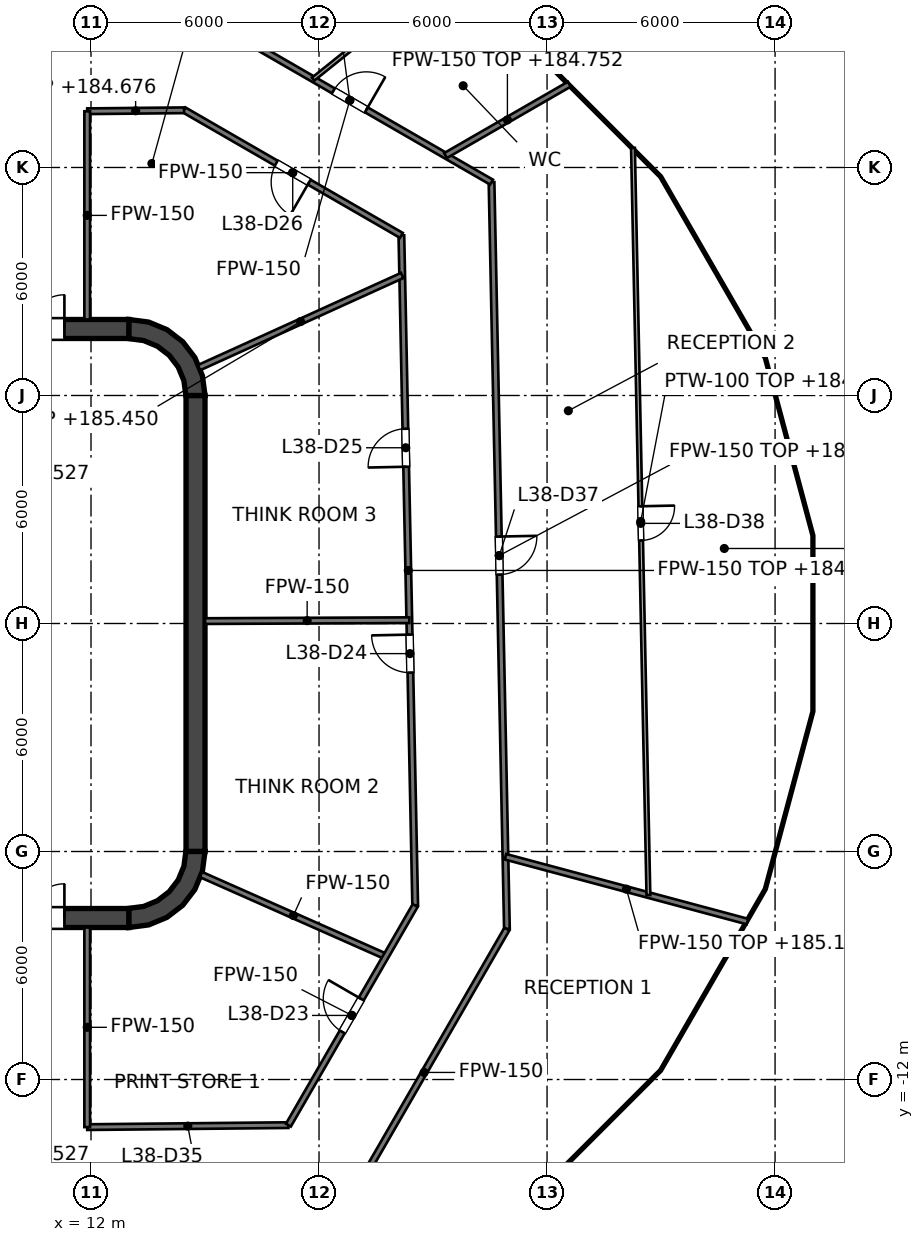
"""IFC4 building model, lengths in metres.
Left out: names, types, materials, properties, quantities, classifications, styles, units other than length and angle.
Written with IfcOpenShell. Run it as: python <this file> out.ifc"""

import sys

from ifc_helpers import new_model, si_unit, direction, frame, frame_2d, origin, place, context, subcontext, project, spatial, polyline, rectangle, outline, extrude, element, fill, save


model = new_model("IFC4")
c1 = context("Model", 3, precision=1e-05, world=origin(), true_north=direction((0.0, 1.0)))
c2 = subcontext(c1, "Body", "Model", "MODEL_VIEW")
j1 = project(units=[si_unit("LENGTHUNIT", "METRE"), si_unit("PLANEANGLEUNIT", "RADIAN")], contexts=[c1])
p1 = place(None, origin())
s1 = spatial("IfcSite", under=j1, at=p1, CompositionType="ELEMENT")
p2 = place(p1, origin())
s2 = spatial("IfcBuilding", under=s1, at=p2, CompositionType="ELEMENT")
p3 = place(p2, frame((0.0, 0.0, 181.6)))
s3 = spatial("IfcBuildingStorey", under=s2, at=p3, CompositionType="ELEMENT", Elevation=181.6)
p4 = place(p3, frame((-13.0, 7.75, 0.0), z_axis=(0.0, 0.0, 1.0), x_axis=(1.0, 0.0, 0.0)))
e1 = element("IfcWall", 1, at=p4, inside=s3, PredefinedType="SHEAR", context=c2, shape_type="SweptSolid", body=[
    extrude(rectangle(XDim=26.0, YDim=0.5, at=frame_2d((13.0, 0.0))), origin(), (0.0, 0.0, 1.0), 4.0),
])
p5 = place(p4, frame((1.7, 0.0, 0.0)))
e2 = element("IfcOpeningElement", 2, at=p5, cuts=e1, PredefinedType="OPENING", context=c2, shape_type="SweptSolid", body=[
    extrude(rectangle(XDim=1.8, YDim=2.1, at=frame_2d((0.9, 1.05))), frame((0.0, 0.25, 0.0), z_axis=(0.0, -1.0, 0.0), x_axis=(1.0, 0.0, 0.0)), (0.0, 0.0, 1.0), 0.5),
])
p6 = place(p4, frame((22.5, 0.0, 0.0)))
e3 = element("IfcOpeningElement", 3, at=p6, cuts=e1, PredefinedType="OPENING", context=c2, shape_type="SweptSolid", body=[
    extrude(rectangle(XDim=1.8, YDim=2.1, at=frame_2d((0.9, 1.05))), frame((0.0, 0.25, 0.0), z_axis=(0.0, -1.0, 0.0), x_axis=(1.0, 0.0, 0.0)), (0.0, 0.0, 1.0), 0.5),
])
p7 = place(p3, frame((-13.0, -7.75, 0.0), z_axis=(0.0, 0.0, 1.0), x_axis=(1.0, 0.0, 0.0)))
e4 = element("IfcWall", 4, at=p7, inside=s3, PredefinedType="SHEAR", context=c2, shape_type="SweptSolid", body=[
    extrude(rectangle(XDim=26.0, YDim=0.5, at=frame_2d((13.0, 0.0))), origin(), (0.0, 0.0, 1.0), 4.0),
])
p8 = place(p7, frame((1.7, 0.0, 0.0)))
e5 = element("IfcOpeningElement", 5, at=p8, cuts=e4, PredefinedType="OPENING", context=c2, shape_type="SweptSolid", body=[
    extrude(rectangle(XDim=1.8, YDim=2.1, at=frame_2d((0.9, 1.05))), frame((0.0, 0.25, 0.0), z_axis=(0.0, -1.0, 0.0), x_axis=(1.0, 0.0, 0.0)), (0.0, 0.0, 1.0), 0.5),
])
p9 = place(p7, frame((22.5, 0.0, 0.0)))
e6 = element("IfcOpeningElement", 6, at=p9, cuts=e4, PredefinedType="OPENING", context=c2, shape_type="SweptSolid", body=[
    extrude(rectangle(XDim=1.8, YDim=2.1, at=frame_2d((0.9, 1.05))), frame((0.0, 0.25, 0.0), z_axis=(0.0, -1.0, 0.0), x_axis=(1.0, 0.0, 0.0)), (0.0, 0.0, 1.0), 0.5),
])
p10 = place(p3, frame((14.75, -6.0, 0.0), z_axis=(0.0, 0.0, 1.0), x_axis=(0.0, 1.0, 0.0)))
e7 = element("IfcWall", 7, at=p10, inside=s3, PredefinedType="SHEAR", context=c2, shape_type="SweptSolid", body=[
    extrude(rectangle(XDim=12.0, YDim=0.5, at=frame_2d((6.0, 0.0))), origin(), (0.0, 0.0, 1.0), 4.0),
])
p11 = place(p3, origin())
e8 = element("IfcWall", 8, at=p11, inside=s3, PredefinedType="SHEAR", context=c2, shape_type="SweptSolid", body=[
    extrude(outline(polyline([(13.0, 8.0), (13.0, 7.496), (13.387, 7.445), (13.748, 7.295), (14.058, 7.058), (14.295, 6.748), (14.445, 6.387), (14.496, 6.0), (15.0, 6.0), (14.932, 6.518), (14.732, 7.0), (14.414, 7.414), (14.0, 7.732), (13.518, 7.932), (13.0, 8.0)])), origin(), (0.0, 0.0, 1.0), 4.0),
])
e9 = element("IfcWall", 9, at=p11, inside=s3, PredefinedType="SHEAR", context=c2, shape_type="SweptSolid", body=[
    extrude(outline(polyline([(15.0, -6.0), (14.496, -6.0), (14.445, -6.387), (14.295, -6.748), (14.058, -7.058), (13.748, -7.295), (13.387, -7.445), (13.0, -7.496), (13.0, -8.0), (13.518, -7.932), (14.0, -7.732), (14.414, -7.414), (14.732, -7.0), (14.932, -6.518), (15.0, -6.0)])), origin(), (0.0, 0.0, 1.0), 4.0),
])
p12 = place(p3, frame((11.8, -7.5, 0.0), z_axis=(0.0, 0.0, 1.0), x_axis=(0.0, 1.0, 0.0)))
e10 = element("IfcWall", 10, at=p12, inside=s3, PredefinedType="SOLIDWALL", context=c2, shape_type="SweptSolid", body=[
    extrude(rectangle(XDim=15.0, YDim=0.4, at=frame_2d((7.5, 0.0))), origin(), (0.0, 0.0, 1.0), 3.85),
])
p13 = place(p12, frame((11.3, 0.0, 0.0)))
e11 = element("IfcOpeningElement", 11, at=p13, cuts=e10, PredefinedType="OPENING", context=c2, shape_type="SweptSolid", body=[
    extrude(rectangle(XDim=1.1, YDim=2.1, at=frame_2d((0.55, 1.05))), frame((0.0, 0.2, 0.0), z_axis=(0.0, -1.0, 0.0), x_axis=(1.0, 0.0, 0.0)), (0.0, 0.0, 1.0), 0.4),
])
p14 = place(p12, frame((8.4, 0.0, 0.0)))
e12 = element("IfcOpeningElement", 12, at=p14, cuts=e10, PredefinedType="OPENING", context=c2, shape_type="SweptSolid", body=[
    extrude(rectangle(XDim=1.1, YDim=2.1, at=frame_2d((0.55, 1.05))), frame((0.0, 0.2, 0.0), z_axis=(0.0, -1.0, 0.0), x_axis=(1.0, 0.0, 0.0)), (0.0, 0.0, 1.0), 0.4),
])
p15 = place(p12, frame((5.5, 0.0, 0.0)))
e13 = element("IfcOpeningElement", 13, at=p15, cuts=e10, PredefinedType="OPENING", context=c2, shape_type="SweptSolid", body=[
    extrude(rectangle(XDim=1.1, YDim=2.1, at=frame_2d((0.55, 1.05))), frame((0.0, 0.2, 0.0), z_axis=(0.0, -1.0, 0.0), x_axis=(1.0, 0.0, 0.0)), (0.0, 0.0, 1.0), 0.4),
])
p16 = place(p12, frame((13.697, 0.0, 0.0)))
e14 = element("IfcOpeningElement", 14, at=p16, cuts=e10, PredefinedType="OPENING", context=c2, shape_type="SweptSolid", body=[
    extrude(rectangle(XDim=0.9, YDim=2.1, at=frame_2d((0.45, 1.05))), frame((0.0, 0.2, 0.0), z_axis=(0.0, -1.0, 0.0), x_axis=(1.0, 0.0, 0.0)), (0.0, 0.0, 1.0), 0.4),
])
p17 = place(p12, frame((0.403, 0.0, 0.0)))
e15 = element("IfcOpeningElement", 15, at=p17, cuts=e10, PredefinedType="OPENING", context=c2, shape_type="SweptSolid", body=[
    extrude(rectangle(XDim=0.9, YDim=2.1, at=frame_2d((0.45, 1.05))), frame((0.0, 0.2, 0.0), z_axis=(0.0, -1.0, 0.0), x_axis=(1.0, 0.0, 0.0)), (0.0, 0.0, 1.0), 0.4),
])
e16 = element("IfcWall", 16, at=p11, inside=s3, PredefinedType="SOLIDWALL", context=c2, shape_type="SweptSolid", body=[
    extrude(outline(polyline([(12.0, -5.675), (12.0, -5.925), (14.25, -5.925), (14.5, -5.925), (14.5, -5.675), (14.5, -3.025), (14.5, -2.775), (14.5, -0.125), (14.5, 0.125), (14.5, 2.775), (14.5, 3.025), (14.5, 5.675), (14.5, 5.925), (14.25, 5.925), (12.0, 5.925), (12.0, 5.675), (14.25, 5.675), (14.25, 3.025), (12.0, 3.025), (12.0, 2.775), (14.25, 2.775), (14.25, 0.125), (12.0, 0.125), (12.0, -0.125), (14.25, -0.125), (14.25, -2.775), (12.0, -2.775), (12.0, -3.025), (14.25, -3.025), (14.25, -5.675), (12.0, -5.675)])), origin(), (0.0, 0.0, 1.0), 3.85),
])
p18 = place(p3, frame((20.167, 10.213, 0.0), z_axis=(0.0, 0.0, 1.0), x_axis=(0.020610894613, -0.999787572949, 0.0)))
e17 = element("IfcWall", 17, at=p18, inside=s3, PredefinedType="PARTITIONING", context=c2, shape_type="SweptSolid", body=[
    extrude(rectangle(XDim=17.637, YDim=0.15, at=frame_2d((8.819, 0.0))), origin(), (0.0, 0.0, 1.0), 2.927),
])
p19 = place(p18, frame((10.508, 0.0, 0.0)))
e18 = element("IfcOpeningElement", 18, at=p19, cuts=e17, PredefinedType="OPENING", context=c2, shape_type="SweptSolid", body=[
    extrude(rectangle(XDim=1.0, YDim=2.1, at=frame_2d((0.5, 1.05))), frame((0.0, 0.075, 0.0), z_axis=(0.0, -1.0, 0.0), x_axis=(1.0, 0.0, 0.0)), (0.0, 0.0, 1.0), 0.15),
])
p20 = place(p18, frame((5.09, 0.0, 0.0)))
e19 = element("IfcOpeningElement", 19, at=p20, cuts=e17, PredefinedType="OPENING", context=c2, shape_type="SweptSolid", body=[
    extrude(rectangle(XDim=1.0, YDim=2.1, at=frame_2d((0.5, 1.05))), frame((0.0, 0.075, 0.0), z_axis=(0.0, -1.0, 0.0), x_axis=(1.0, 0.0, 0.0)), (0.0, 0.0, 1.0), 0.15),
])
p21 = place(p3, frame((22.539, 11.615, 0.0), z_axis=(0.0, 0.0, 1.0), x_axis=(0.020613919434, -0.999787510587, 0.0)))
e20 = element("IfcWall", 20, at=p21, inside=s3, PredefinedType="PARTITIONING", context=c2, shape_type="SweptSolid", body=[
    extrude(rectangle(XDim=19.66, YDim=0.15, at=frame_2d((9.83, 0.0))), origin(), (0.0, 0.0, 1.0), 2.927),
])
p22 = place(p21, frame((9.33, 0.0, 0.0)))
e21 = element("IfcOpeningElement", 21, at=p22, cuts=e20, PredefinedType="OPENING", context=c2, shape_type="SweptSolid", body=[
    extrude(rectangle(XDim=1.0, YDim=2.1, at=frame_2d((0.5, 1.05))), frame((0.0, 0.075, 0.0), z_axis=(0.0, -1.0, 0.0), x_axis=(1.0, 0.0, 0.0)), (0.0, 0.0, 1.0), 0.15),
])
p23 = place(p3, frame((14.448, 13.515, 0.0), z_axis=(0.0, 0.0, 1.0), x_axis=(0.866016279763, -0.500015802937, 0.0)))
e22 = element("IfcWall", 22, at=p23, inside=s3, PredefinedType="PARTITIONING", context=c2, shape_type="SweptSolid", body=[
    extrude(rectangle(XDim=6.604, YDim=0.15, at=frame_2d((3.302, 0.0))), origin(), (0.0, 0.0, 1.0), 2.995),
])
p24 = place(p23, frame((2.802, 0.0, 0.0)))
e23 = element("IfcOpeningElement", 23, at=p24, cuts=e22, PredefinedType="OPENING", context=c2, shape_type="SweptSolid", body=[
    extrude(rectangle(XDim=1.0, YDim=2.1, at=frame_2d((0.5, 1.05))), frame((0.0, 0.075, 0.0), z_axis=(0.0, -1.0, 0.0), x_axis=(1.0, 0.0, 0.0)), (0.0, 0.0, 1.0), 0.15),
])
p25 = place(p3, frame((15.08, 15.921, 0.0), z_axis=(0.0, 0.0, 1.0), x_axis=(0.866020838546, -0.500007907142, 0.0)))
e24 = element("IfcWall", 24, at=p25, inside=s3, PredefinedType="PARTITIONING", context=c2, shape_type="SweptSolid", body=[
    extrude(rectangle(XDim=8.613, YDim=0.15, at=frame_2d((4.306, 0.0))), origin(), (0.0, 0.0, 1.0), 2.995),
])
p26 = place(p25, frame((3.808, 0.0, 0.0)))
e25 = element("IfcOpeningElement", 25, at=p26, cuts=e24, PredefinedType="OPENING", context=c2, shape_type="SweptSolid", body=[
    extrude(rectangle(XDim=1.0, YDim=2.1, at=frame_2d((0.5, 1.05))), frame((0.0, 0.075, 0.0), z_axis=(0.0, -1.0, 0.0), x_axis=(1.0, 0.0, 0.0)), (0.0, 0.0, 1.0), 0.15),
])
p27 = place(p3, frame((14.895, -6.607, 0.0), z_axis=(0.0, 0.0, 1.0), x_axis=(0.914233271379, -0.405188259337, 0.0)))
e26 = element("IfcWall", 26, at=p27, inside=s3, PredefinedType="PARTITIONING", context=c2, shape_type="SweptSolid", body=[
    extrude(rectangle(XDim=5.317, YDim=0.15, at=frame_2d((2.659, 0.0))), origin(), (0.0, 0.0, 1.0), 2.995),
])
p28 = place(p3, frame((22.905, -6.138, 0.0), z_axis=(0.0, 0.0, 1.0), x_axis=(0.965933668704, -0.258789775039, 0.0)))
e27 = element("IfcWall", 27, at=p28, inside=s3, PredefinedType="PARTITIONING", context=c2, shape_type="SweptSolid", body=[
    extrude(rectangle(XDim=6.592, YDim=0.15, at=frame_2d((3.296, 0.0))), origin(), (0.0, 0.0, 1.0), 3.527),
])
p29 = place(p3, frame((15.0, 0.063, 0.0), z_axis=(0.0, 0.0, 1.0), x_axis=(0.999990294223, 0.004405843865, 0.0)))
e28 = element("IfcWall", 28, at=p29, inside=s3, PredefinedType="PARTITIONING", context=c2, shape_type="SweptSolid", body=[
    extrude(rectangle(XDim=5.375, YDim=0.15, at=frame_2d((2.688, 0.0))), origin(), (0.0, 0.0, 1.0), 2.995),
])
p30 = place(p3, frame((11.9, -13.253, 0.0), z_axis=(0.0, 0.0, 1.0), x_axis=(0.999950853109, 0.009914200296, 0.0)))
e29 = element("IfcWall", 29, at=p30, inside=s3, PredefinedType="PARTITIONING", context=c2, shape_type="SweptSolid", body=[
    extrude(rectangle(XDim=5.294, YDim=0.15, at=frame_2d((2.647, 0.0))), origin(), (0.0, 0.0, 1.0), 3.076),
])
p31 = place(p3, frame((11.9, 13.48, 0.0), z_axis=(0.0, 0.0, 1.0), x_axis=(0.999950357576, 0.009964054536, 0.0)))
e30 = element("IfcWall", 30, at=p31, inside=s3, PredefinedType="PARTITIONING", context=c2, shape_type="SweptSolid", body=[
    extrude(rectangle(XDim=2.548, YDim=0.15, at=frame_2d((1.274, 0.0))), origin(), (0.0, 0.0, 1.0), 3.076),
])
p32 = place(p3, frame((14.843, 6.733, 0.0), z_axis=(0.0, 0.0, 1.0), x_axis=(0.910628361306, 0.413226315214, 0.0)))
e31 = element("IfcWall", 31, at=p32, inside=s3, PredefinedType="PARTITIONING", context=c2, shape_type="SweptSolid", body=[
    extrude(rectangle(XDim=5.87, YDim=0.15, at=frame_2d((2.935, 0.0))), origin(), (0.0, 0.0, 1.0), 3.85),
])
p33 = place(p3, frame((21.329, 12.314, 0.0), z_axis=(0.0, 0.0, 1.0), x_axis=(0.866293710665, 0.499534990628, 0.0)))
e32 = element("IfcWall", 32, at=p33, inside=s3, PredefinedType="PARTITIONING", context=c2, shape_type="SweptSolid", body=[
    extrude(rectangle(XDim=3.758, YDim=0.15, at=frame_2d((1.879, 0.0))), origin(), (0.0, 0.0, 1.0), 3.152),
])
p34 = place(p3, frame((18.587, -15.587, 0.0), z_axis=(0.0, 0.0, 1.0), x_axis=(0.499993286632, 0.866029279715, 0.0)))
e33 = element("IfcWall", 33, at=p34, inside=s3, PredefinedType="PARTITIONING", context=c2, shape_type="SweptSolid", body=[
    extrude(rectangle(XDim=8.713, YDim=0.15, at=frame_2d((4.357, 0.0))), origin(), (0.0, 0.0, 1.0), 2.995),
])
p35 = place(p3, frame((17.194, -13.201, 0.0), z_axis=(0.0, 0.0, 1.0), x_axis=(0.499983182885, 0.866035112932, 0.0)))
e34 = element("IfcWall", 34, at=p35, inside=s3, PredefinedType="PARTITIONING", context=c2, shape_type="SweptSolid", body=[
    extrude(rectangle(XDim=6.674, YDim=0.15, at=frame_2d((3.337, 0.0))), origin(), (0.0, 0.0, 1.0), 2.995),
])
p36 = place(p35, frame((2.834, 0.0, 0.0)))
e35 = element("IfcOpeningElement", 35, at=p36, cuts=e34, PredefinedType="OPENING", context=c2, shape_type="SweptSolid", body=[
    extrude(rectangle(XDim=1.0, YDim=2.1, at=frame_2d((0.5, 1.05))), frame((0.0, 0.075, 0.0), z_axis=(0.0, -1.0, 0.0), x_axis=(1.0, 0.0, 0.0)), (0.0, 0.0, 1.0), 0.15),
])
p37 = place(p3, frame((11.9, -13.253, 0.0), z_axis=(0.0, 0.0, 1.0), x_axis=(0.0, 1.0, 0.0)))
e36 = element("IfcWall", 36, at=p37, inside=s3, PredefinedType="PARTITIONING", context=c2, shape_type="SweptSolid", body=[
    extrude(rectangle(XDim=5.253, YDim=0.15, at=frame_2d((2.626, 0.0))), origin(), (0.0, 0.0, 1.0), 2.995),
])
p38 = place(p3, frame((11.9, 8.0, 0.0), z_axis=(0.0, 0.0, 1.0), x_axis=(0.0, 1.0, 0.0)))
e37 = element("IfcWall", 37, at=p38, inside=s3, PredefinedType="PARTITIONING", context=c2, shape_type="SweptSolid", body=[
    extrude(rectangle(XDim=5.479, YDim=0.15, at=frame_2d((2.74, 0.0))), origin(), (0.0, 0.0, 1.0), 2.995),
])
p39 = place(p3, frame((26.261, 12.516, 0.0), z_axis=(0.0, 0.0, 1.0), x_axis=(0.020644749829, -0.999786874441, 0.0)))
e38 = element("IfcWall", 38, at=p39, inside=s3, PredefinedType="PARTITIONING", context=c2, shape_type="SweptSolid", body=[
    extrude(rectangle(XDim=19.666, YDim=0.1, at=frame_2d((9.833, 0.0))), origin(), (0.0, 0.0, 1.0), 2.927),
])
p40 = place(p39, frame((9.433, 0.0, 0.0)))
e39 = element("IfcOpeningElement", 39, at=p40, cuts=e38, PredefinedType="OPENING", context=c2, shape_type="SweptSolid", body=[
    extrude(rectangle(XDim=0.9, YDim=2.1, at=frame_2d((0.45, 1.05))), frame((0.0, 0.05, 0.0), z_axis=(0.0, -1.0, 0.0), x_axis=(1.0, 0.0, 0.0)), (0.0, 0.0, 1.0), 0.1),
])
p41 = place(p3, frame((17.845, 14.325, 0.0), z_axis=(0.0, 0.0, 1.0), x_axis=(0.779817060652, 0.626007469537, 0.0)))
e40 = element("IfcWall", 40, at=p41, inside=s3, PredefinedType="PARTITIONING", context=c2, shape_type="SweptSolid", body=[
    extrude(rectangle(XDim=4.013, YDim=0.1, at=frame_2d((2.006, 0.0))), origin(), (0.0, 0.0, 1.0), 3.85),
])
p42 = place(p13, origin())
e41 = element("IfcDoor", 41, at=p42, inside=s3, OperationType="DOUBLE_DOOR_SLIDING", PredefinedType="DOOR", context=c2, shape_type="SweptSolid", body=[
    extrude(rectangle(XDim=1.1, YDim=2.1, at=frame_2d((0.55, 1.05))), frame((0.0, 0.025, 0.0), z_axis=(0.0, -1.0, 0.0), x_axis=(1.0, 0.0, 0.0)), (0.0, 0.0, 1.0), 0.05),
])
fill(e11, e41)
p43 = place(p14, origin())
e42 = element("IfcDoor", 42, at=p43, inside=s3, OperationType="DOUBLE_DOOR_SLIDING", PredefinedType="DOOR", context=c2, shape_type="SweptSolid", body=[
    extrude(rectangle(XDim=1.1, YDim=2.1, at=frame_2d((0.55, 1.05))), frame((0.0, 0.025, 0.0), z_axis=(0.0, -1.0, 0.0), x_axis=(1.0, 0.0, 0.0)), (0.0, 0.0, 1.0), 0.05),
])
fill(e12, e42)
p44 = place(p15, origin())
e43 = element("IfcDoor", 43, at=p44, inside=s3, OperationType="DOUBLE_DOOR_SLIDING", PredefinedType="DOOR", context=c2, shape_type="SweptSolid", body=[
    extrude(rectangle(XDim=1.1, YDim=2.1, at=frame_2d((0.55, 1.05))), frame((0.0, 0.025, 0.0), z_axis=(0.0, -1.0, 0.0), x_axis=(1.0, 0.0, 0.0)), (0.0, 0.0, 1.0), 0.05),
])
fill(e13, e43)
p45 = place(p16, origin())
e44 = element("IfcDoor", 44, at=p45, inside=s3, OperationType="SINGLE_SWING_RIGHT", PredefinedType="DOOR", context=c2, shape_type="SweptSolid", body=[
    extrude(rectangle(XDim=0.9, YDim=2.1, at=frame_2d((0.45, 1.05))), frame((0.0, 0.025, 0.0), z_axis=(0.0, -1.0, 0.0), x_axis=(1.0, 0.0, 0.0)), (0.0, 0.0, 1.0), 0.05),
])
fill(e14, e44)
p46 = place(p17, origin())
e45 = element("IfcDoor", 45, at=p46, inside=s3, OperationType="SINGLE_SWING_RIGHT", PredefinedType="DOOR", context=c2, shape_type="SweptSolid", body=[
    extrude(rectangle(XDim=0.9, YDim=2.1, at=frame_2d((0.45, 1.05))), frame((0.0, 0.025, 0.0), z_axis=(0.0, -1.0, 0.0), x_axis=(1.0, 0.0, 0.0)), (0.0, 0.0, 1.0), 0.05),
])
fill(e15, e45)
p47 = place(p6, origin())
e46 = element("IfcDoor", 46, at=p47, inside=s3, OperationType="DOUBLE_DOOR_SINGLE_SWING", PredefinedType="DOOR", context=c2, shape_type="SweptSolid", body=[
    extrude(rectangle(XDim=1.8, YDim=2.1, at=frame_2d((0.9, 1.05))), frame((0.0, 0.025, 0.0), z_axis=(0.0, -1.0, 0.0), x_axis=(1.0, 0.0, 0.0)), (0.0, 0.0, 1.0), 0.05),
])
fill(e3, e46)
p48 = place(p9, origin())
e47 = element("IfcDoor", 47, at=p48, inside=s3, OperationType="DOUBLE_DOOR_SINGLE_SWING", PredefinedType="DOOR", context=c2, shape_type="SweptSolid", body=[
    extrude(rectangle(XDim=1.8, YDim=2.1, at=frame_2d((0.9, 1.05))), frame((0.0, 0.025, 0.0), z_axis=(0.0, -1.0, 0.0), x_axis=(1.0, 0.0, 0.0)), (0.0, 0.0, 1.0), 0.05),
])
fill(e6, e47)
p49 = place(p36, origin())
e48 = element("IfcDoor", 48, at=p49, inside=s3, OperationType="SINGLE_SWING_RIGHT", PredefinedType="DOOR", context=c2, shape_type="SweptSolid", body=[
    extrude(rectangle(XDim=1.0, YDim=2.1, at=frame_2d((0.5, 1.05))), frame((0.0, 0.025, 0.0), z_axis=(0.0, -1.0, 0.0), x_axis=(1.0, 0.0, 0.0)), (0.0, 0.0, 1.0), 0.05),
])
fill(e35, e48)
p50 = place(p19, origin())
e49 = element("IfcDoor", 49, at=p50, inside=s3, OperationType="SINGLE_SWING_LEFT", PredefinedType="DOOR", context=c2, shape_type="SweptSolid", body=[
    extrude(rectangle(XDim=1.0, YDim=2.1, at=frame_2d((0.5, 1.05))), frame((0.0, 0.025, 0.0), z_axis=(0.0, -1.0, 0.0), x_axis=(1.0, 0.0, 0.0)), (0.0, 0.0, 1.0), 0.05),
])
fill(e18, e49)
p51 = place(p20, origin())
e50 = element("IfcDoor", 50, at=p51, inside=s3, OperationType="SINGLE_SWING_RIGHT", PredefinedType="DOOR", context=c2, shape_type="SweptSolid", body=[
    extrude(rectangle(XDim=1.0, YDim=2.1, at=frame_2d((0.5, 1.05))), frame((0.0, 0.025, 0.0), z_axis=(0.0, -1.0, 0.0), x_axis=(1.0, 0.0, 0.0)), (0.0, 0.0, 1.0), 0.05),
])
fill(e19, e50)
p52 = place(p24, origin())
e51 = element("IfcDoor", 51, at=p52, inside=s3, OperationType="SINGLE_SWING_RIGHT", PredefinedType="DOOR", context=c2, shape_type="SweptSolid", body=[
    extrude(rectangle(XDim=1.0, YDim=2.1, at=frame_2d((0.5, 1.05))), frame((0.0, 0.025, 0.0), z_axis=(0.0, -1.0, 0.0), x_axis=(1.0, 0.0, 0.0)), (0.0, 0.0, 1.0), 0.05),
])
fill(e23, e51)
p53 = place(p22, origin())
e52 = element("IfcDoor", 52, at=p53, inside=s3, OperationType="SINGLE_SWING_LEFT", PredefinedType="DOOR", context=c2, shape_type="SweptSolid", body=[
    extrude(rectangle(XDim=1.0, YDim=2.1, at=frame_2d((0.5, 1.05))), frame((0.0, 0.025, 0.0), z_axis=(0.0, -1.0, 0.0), x_axis=(1.0, 0.0, 0.0)), (0.0, 0.0, 1.0), 0.05),
])
fill(e21, e52)
p54 = place(p40, origin())
e53 = element("IfcDoor", 53, at=p54, inside=s3, OperationType="SINGLE_SWING_LEFT", PredefinedType="DOOR", context=c2, shape_type="SweptSolid", body=[
    extrude(rectangle(XDim=0.9, YDim=2.1, at=frame_2d((0.45, 1.05))), frame((0.0, 0.025, 0.0), z_axis=(0.0, -1.0, 0.0), x_axis=(1.0, 0.0, 0.0)), (0.0, 0.0, 1.0), 0.05),
])
fill(e39, e53)
p55 = place(p26, origin())
e54 = element("IfcDoor", 54, at=p55, inside=s3, OperationType="SINGLE_SWING_RIGHT", PredefinedType="DOOR", context=c2, shape_type="SweptSolid", body=[
    extrude(rectangle(XDim=1.0, YDim=2.1, at=frame_2d((0.5, 1.05))), frame((0.0, 0.025, 0.0), z_axis=(0.0, -1.0, 0.0), x_axis=(1.0, 0.0, 0.0)), (0.0, 0.0, 1.0), 0.05),
])
fill(e25, e54)
save(model, sys.argv[1])
